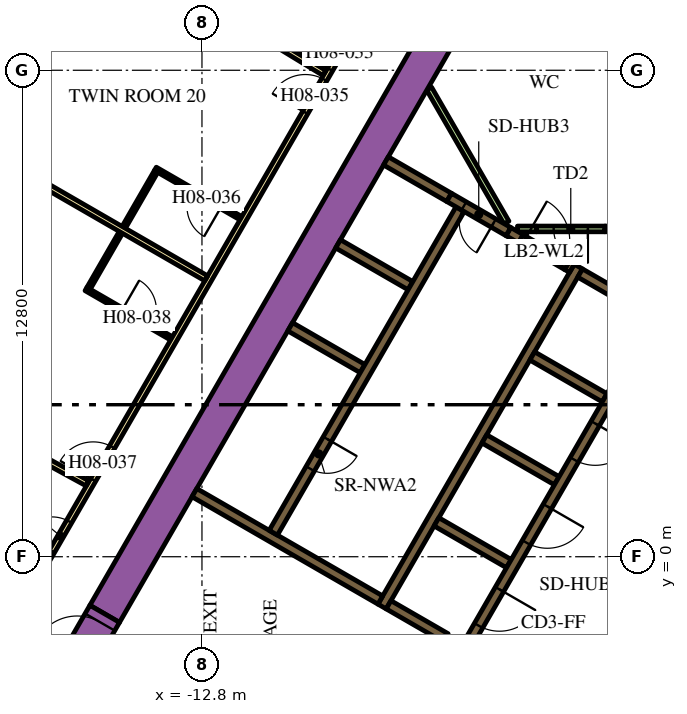
"""IFC4 building model, lengths in metres.
Left out: names, types, materials, properties, quantities, classifications, styles, units other than length and angle.
Written with IfcOpenShell. Run it as: python <this file> out.ifc"""

import sys

from ifc_helpers import new_model, si_unit, direction, frame, frame_2d, origin, place, context, subcontext, project, spatial, polyline, rectangle, outline, extrude, element, fill, save


model = new_model("IFC4")
c1 = context("Model", 3, precision=1e-05, world=origin(), true_north=direction((0.0, 1.0)))
c2 = subcontext(c1, "Body", "Model", "MODEL_VIEW")
j1 = project(units=[si_unit("LENGTHUNIT", "METRE"), si_unit("PLANEANGLEUNIT", "RADIAN")], contexts=[c1])
p1 = place(None, origin())
s1 = spatial("IfcSite", under=j1, at=p1, CompositionType="ELEMENT")
p2 = place(p1, origin())
s2 = spatial("IfcBuilding", under=s1, at=p2, CompositionType="ELEMENT")
p3 = place(p2, frame((0.0, 0.0, 114.9)))
s3 = spatial("IfcBuildingStorey", under=s2, at=p3, CompositionType="ELEMENT", Elevation=114.9)
p4 = place(p3, frame((-15.36, -1.503, 0.0), z_axis=(0.0, 0.0, 1.0), x_axis=(0.50000389221, 0.866023156604, 0.0)))
e1 = element("IfcWall", 1, at=p4, inside=s3, PredefinedType="SOLIDWALL", context=c2, shape_type="SweptSolid", body=[
    extrude(rectangle(XDim=21.0, YDim=0.9, at=frame_2d((10.5, 0.0))), origin(), (0.0, 0.0, 1.0), 3.9),
])
p5 = place(p3, frame((-8.06, -1.311, 0.0), z_axis=(0.0, 0.0, 1.0), x_axis=(0.50000273126, 0.866023826885, 0.0)))
e2 = element("IfcWall", 2, at=p5, inside=s3, PredefinedType="SOLIDWALL", context=c2, shape_type="SweptSolid", body=[
    extrude(rectangle(XDim=10.33, YDim=0.25, at=frame_2d((5.165, 0.0))), origin(), (0.0, 0.0, 1.0), 3.9),
])
p6 = place(p3, frame((-1.647, 6.771, 0.0), z_axis=(0.0, 0.0, 1.0), x_axis=(-0.865971728693, 0.500092956464, 0.0)))
e3 = element("IfcWall", 3, at=p6, inside=s3, PredefinedType="SOLIDWALL", context=c2, shape_type="SweptSolid", body=[
    extrude(rectangle(XDim=1.388, YDim=0.25, at=frame_2d((0.694, 0.0))), origin(), (0.0, 0.0, 1.0), 3.9),
])
for number, where, z_axis, x_axis in (
    (4, (-2.204, 4.182, 0.0), (0.0, 0.0, 1.0), (-0.866, 0.5, 0.0)),
    (5, (-5.369, 3.1, 0.0), (0.0, 0.0, 1.0), (0.866, -0.5, 0.0)),
    (6, (-4.724, -0.182, 0.0), (0.0, 0.0, 1.0), (-0.866, 0.5, 0.0)),
):
    element("IfcWall", number, at=place(p3, frame(where, z_axis=z_axis, x_axis=x_axis)), inside=s3, PredefinedType="SOLIDWALL", context=c2, shape_type="SweptSolid", body=[
        extrude(rectangle(XDim=2.2, YDim=0.25, at=frame_2d((1.1, 0.0))), origin(), (0.0, 0.0, 1.0), 3.9),
    ])
p7 = place(p3, frame((-7.889, -1.265, 0.0), z_axis=(0.0, 0.0, 1.0), x_axis=(0.865986741702, -0.500066958712, 0.0)))
e7 = element("IfcWall", 7, at=p7, inside=s3, PredefinedType="SOLIDWALL", context=c2, shape_type="SweptSolid", body=[
    extrude(rectangle(XDim=1.738, YDim=0.25, at=frame_2d((0.869, 0.0))), origin(), (0.0, 0.0, 1.0), 3.9),
])
p8 = place(p3, frame((-8.106, -1.14, 0.0), z_axis=(0.0, 0.0, 1.0), x_axis=(-0.866000643155, 0.500042884217, 0.0)))
e8 = element("IfcWall", 8, at=p8, inside=s3, PredefinedType="SOLIDWALL", context=c2, shape_type="SweptSolid", body=[
    extrude(rectangle(XDim=5.65, YDim=0.25, at=frame_2d((2.825, 0.0))), origin(), (0.0, 0.0, 1.0), 3.9),
])
p9 = place(p3, origin())
e9 = element("IfcWall", 9, at=p9, inside=s3, PredefinedType="SOLIDWALL", context=c2, shape_type="SweptSolid", body=[
    extrude(outline(polyline([(-3.128, 7.481), (-3.259, 7.557), (-3.134, 7.773), (-3.003, 7.698), (-3.128, 7.481)])), origin(), (0.0, 0.0, 1.0), 3.9),
])
for number, where, z_axis, x_axis in (
    (10, (-8.574, 4.95, 0.0), (0.0, 0.0, 1.0), (-0.866, 0.5, 0.0)),
    (11, (-7.314, 7.132, 0.0), (0.0, 0.0, 1.0), (-0.866, 0.5, 0.0)),
):
    element("IfcWall", number, at=place(p3, frame(where, z_axis=z_axis, x_axis=x_axis)), inside=s3, PredefinedType="SOLIDWALL", context=c2, shape_type="SweptSolid", body=[
        extrude(rectangle(XDim=2.2, YDim=0.25, at=frame_2d((1.1, 0.0))), origin(), (0.0, 0.0, 1.0), 3.9),
    ])
p10 = place(p3, frame((-6.296, 9.455, 0.0), z_axis=(0.0, 0.0, 1.0), x_axis=(-0.866011930837, 0.500023335103, 0.0)))
e12 = element("IfcWall", 12, at=p10, inside=s3, PredefinedType="SOLIDWALL", context=c2, shape_type="SweptSolid", body=[
    extrude(rectangle(XDim=1.92, YDim=0.25, at=frame_2d((0.96, 0.0))), origin(), (0.0, 0.0, 1.0), 3.9),
])
p11 = place(p3, frame((-4.409, 8.365, 0.0), z_axis=(0.0, 0.0, 1.0), x_axis=(-0.866057014183, 0.499945245186, 0.0)))
e13 = element("IfcWall", 13, at=p11, inside=s3, PredefinedType="SOLIDWALL", context=c2, shape_type="SweptSolid", body=[
    extrude(rectangle(XDim=0.379, YDim=0.25, at=frame_2d((0.19, 0.0))), origin(), (0.0, 0.0, 1.0), 3.9),
])
p12 = place(p3, frame((-2.195, 8.625, 0.0), z_axis=(0.0, 0.0, 1.0), x_axis=(1.0, 0.0, 0.0)))
e14 = element("IfcWall", 14, at=p12, inside=s3, PredefinedType="PARTITIONING", context=c2, shape_type="SweptSolid", body=[
    extrude(rectangle(XDim=1.145, YDim=0.15, at=frame_2d((0.573, 0.0))), origin(), (0.0, 0.0, 1.0), 2.75),
])
p13 = place(p3, frame((-6.823, 12.318, 0.0), z_axis=(0.0, 0.0, 1.0), x_axis=(0.500007885066, -0.866020851292, 0.0)))
e15 = element("IfcWall", 15, at=p13, inside=s3, PredefinedType="PARTITIONING", context=c2, shape_type="SweptSolid", body=[
    extrude(rectangle(XDim=4.072, YDim=0.15, at=frame_2d((2.036, 0.0))), origin(), (0.0, 0.0, 1.0), 2.75),
])
p14 = place(p3, frame((-4.498, 8.625, 0.0), z_axis=(0.0, 0.0, 1.0), x_axis=(1.0, 0.0, 0.0)))
e16 = element("IfcWall", 16, at=p14, inside=s3, PredefinedType="PARTITIONING", context=c2, shape_type="SweptSolid", body=[
    extrude(rectangle(XDim=0.502, YDim=0.15, at=frame_2d((0.251, 0.0))), origin(), (0.0, 0.0, 1.0), 2.75),
])
p15 = place(p3, frame((-6.008, 9.144, 0.0), z_axis=(0.0, 0.0, 1.0), x_axis=(-0.500006956611, -0.866021387346, 0.0)))
e17 = element("IfcWall", 17, at=p15, inside=s3, PredefinedType="SOLIDWALL", context=c2, shape_type="SweptSolid", body=[
    extrude(rectangle(XDim=9.83, YDim=0.25, at=frame_2d((4.915, 0.0))), origin(), (0.0, 0.0, 1.0), 3.9),
])
p16 = place(p15, frame((6.985, 0.0, 0.0)))
e18 = element("IfcOpeningElement", 18, at=p16, cuts=e17, PredefinedType="OPENING", context=c2, shape_type="SweptSolid", body=[
    extrude(rectangle(XDim=0.9, YDim=2.1, at=frame_2d((0.45, 1.05))), frame((0.0, 0.135, 0.0), z_axis=(0.0, -1.0, 0.0), x_axis=(1.0, 0.0, 0.0)), (0.0, 0.0, 1.0), 0.27),
])
p17 = place(p3, frame((-0.898, 6.194, 0.0), z_axis=(0.0, 0.0, 1.0), x_axis=(-0.499996202215, -0.866027596426, 0.0)))
e19 = element("IfcWall", 19, at=p17, inside=s3, PredefinedType="SOLIDWALL", context=c2, shape_type="SweptSolid", body=[
    extrude(rectangle(XDim=9.83, YDim=0.25, at=frame_2d((4.915, 0.0))), origin(), (0.0, 0.0, 1.0), 3.9),
])
p18 = place(p17, frame((0.585, 0.0, 0.0)))
e20 = element("IfcOpeningElement", 20, at=p18, cuts=e19, PredefinedType="OPENING", context=c2, shape_type="SweptSolid", body=[
    extrude(rectangle(XDim=1.1, YDim=2.1, at=frame_2d((0.55, 1.05))), frame((0.0, 0.135, 0.0), z_axis=(0.0, -1.0, 0.0), x_axis=(1.0, 0.0, 0.0)), (0.0, 0.0, 1.0), 0.27),
])
p19 = place(p17, frame((3.105, 0.0, 0.0)))
e21 = element("IfcOpeningElement", 21, at=p19, cuts=e19, PredefinedType="OPENING", context=c2, shape_type="SweptSolid", body=[
    extrude(rectangle(XDim=1.1, YDim=2.1, at=frame_2d((0.55, 1.05))), frame((0.0, 0.135, 0.0), z_axis=(0.0, -1.0, 0.0), x_axis=(1.0, 0.0, 0.0)), (0.0, 0.0, 1.0), 0.27),
])
p20 = place(p17, frame((5.625, 0.0, 0.0)))
e22 = element("IfcOpeningElement", 22, at=p20, cuts=e19, PredefinedType="OPENING", context=c2, shape_type="SweptSolid", body=[
    extrude(rectangle(XDim=1.1, YDim=2.1, at=frame_2d((0.55, 1.05))), frame((0.0, 0.135, 0.0), z_axis=(0.0, -1.0, 0.0), x_axis=(1.0, 0.0, 0.0)), (0.0, 0.0, 1.0), 0.27),
])
p21 = place(p17, frame((8.145, 0.0, 0.0)))
e23 = element("IfcOpeningElement", 23, at=p21, cuts=e19, PredefinedType="OPENING", context=c2, shape_type="SweptSolid", body=[
    extrude(rectangle(XDim=1.1, YDim=2.1, at=frame_2d((0.55, 1.05))), frame((0.0, 0.135, 0.0), z_axis=(0.0, -1.0, 0.0), x_axis=(1.0, 0.0, 0.0)), (0.0, 0.0, 1.0), 0.27),
])
p22 = place(p3, frame((-2.195, 8.625, 0.0), z_axis=(0.0, 0.0, 1.0), x_axis=(-1.0, 0.0, 0.0)))
e24 = element("IfcWall", 24, at=p22, inside=s3, PredefinedType="PARTITIONING", context=c2, shape_type="SweptSolid", body=[
    extrude(rectangle(XDim=1.8, YDim=0.15, at=frame_2d((0.9, 0.0))), origin(), (0.0, 0.0, 1.0), 2.75),
])
p23 = place(p22, frame((0.45, 0.0, 0.0)))
e25 = element("IfcOpeningElement", 25, at=p23, cuts=e24, PredefinedType="OPENING", context=c2, shape_type="SweptSolid", body=[
    extrude(rectangle(XDim=0.9, YDim=2.1, at=frame_2d((0.45, 1.05))), frame((0.0, 0.085, 0.0), z_axis=(0.0, -1.0, 0.0), x_axis=(1.0, 0.0, 0.0)), (0.0, 0.0, 1.0), 0.17),
])
p24 = place(p3, frame((-4.409, 8.365, 0.0), z_axis=(0.0, 0.0, 1.0), x_axis=(0.866034573852, -0.49998411664, 0.0)))
e26 = element("IfcWall", 26, at=p24, inside=s3, PredefinedType="SOLIDWALL", context=c2, shape_type="SweptSolid", body=[
    extrude(rectangle(XDim=1.4, YDim=0.25, at=frame_2d((0.7, 0.0))), origin(), (0.0, 0.0, 1.0), 3.9),
])
p25 = place(p24, frame((0.1, 0.0, 0.0)))
e27 = element("IfcOpeningElement", 27, at=p25, cuts=e26, PredefinedType="OPENING", context=c2, shape_type="SweptSolid", body=[
    extrude(rectangle(XDim=1.2, YDim=2.1, at=frame_2d((0.6, 1.05))), frame((0.0, 0.135, 0.0), z_axis=(0.0, -1.0, 0.0), x_axis=(1.0, 0.0, 0.0)), (0.0, 0.0, 1.0), 0.27),
])
p26 = place(p3, frame((-16.209, -2.976, 0.0), z_axis=(0.0, 0.0, 1.0), x_axis=(0.499954529098, 0.86605165483, 0.0)))
e28 = element("IfcWall", 28, at=p26, inside=s3, PredefinedType="SOLIDWALL", context=c2, shape_type="SweptSolid", body=[
    extrude(rectangle(XDim=1.7, YDim=0.9, at=frame_2d((0.85, 0.0))), origin(), (0.0, 0.0, 1.0), 3.9),
])
p27 = place(p26, frame((0.25, 0.0, 0.0)))
e29 = element("IfcOpeningElement", 29, at=p27, cuts=e28, PredefinedType="OPENING", context=c2, shape_type="SweptSolid", body=[
    extrude(rectangle(XDim=1.2, YDim=2.1, at=frame_2d((0.6, 1.05))), frame((0.0, 0.46, 0.0), z_axis=(0.0, -1.0, 0.0), x_axis=(1.0, 0.0, 0.0)), (0.0, 0.0, 1.0), 0.92),
])
p28 = place(p3, frame((-4.737, 8.555, 0.0), z_axis=(0.0, 0.0, 1.0), x_axis=(-0.865989075817, 0.500062916607, 0.0)))
e30 = element("IfcWall", 30, at=p28, inside=s3, PredefinedType="SOLIDWALL", context=c2, shape_type="SweptSolid", body=[
    extrude(rectangle(XDim=1.8, YDim=0.25, at=frame_2d((0.9, 0.0))), origin(), (0.0, 0.0, 1.0), 3.9),
])
p29 = place(p28, frame((0.45, 0.0, 0.0)))
e31 = element("IfcOpeningElement", 31, at=p29, cuts=e30, PredefinedType="OPENING", context=c2, shape_type="SweptSolid", body=[
    extrude(rectangle(XDim=0.9, YDim=2.1, at=frame_2d((0.45, 1.05))), frame((0.0, 0.135, 0.0), z_axis=(0.0, -1.0, 0.0), x_axis=(1.0, 0.0, 0.0)), (0.0, 0.0, 1.0), 0.27),
])
p30 = place(p3, frame((-19.081, -3.9, 0.0), z_axis=(0.0, 0.0, 1.0), x_axis=(0.499998313975, 0.866026377209, 0.0)))
e32 = element("IfcWall", 32, at=p30, inside=s3, PredefinedType="PARTITIONING", context=c2, shape_type="SweptSolid", body=[
    extrude(rectangle(XDim=25.766, YDim=0.15, at=frame_2d((12.883, 0.0))), origin(), (0.0, 0.0, 1.0), 2.75),
])
p31 = place(p30, frame((19.306, 0.0, 0.0)))
e33 = element("IfcOpeningElement", 33, at=p31, cuts=e32, PredefinedType="OPENING", context=c2, shape_type="SweptSolid", body=[
    extrude(rectangle(XDim=1.0, YDim=2.1, at=frame_2d((0.5, 1.05))), frame((0.0, 0.085, 0.0), z_axis=(0.0, -1.0, 0.0), x_axis=(1.0, 0.0, 0.0)), (0.0, 0.0, 1.0), 0.17),
])
p32 = place(p30, frame((18.0, 0.0, 0.0)))
e34 = element("IfcOpeningElement", 34, at=p32, cuts=e32, PredefinedType="OPENING", context=c2, shape_type="SweptSolid", body=[
    extrude(rectangle(XDim=1.0, YDim=2.1, at=frame_2d((0.5, 1.05))), frame((0.0, 0.085, 0.0), z_axis=(0.0, -1.0, 0.0), x_axis=(1.0, 0.0, 0.0)), (0.0, 0.0, 1.0), 0.17),
])
p33 = place(p30, frame((6.838, 0.0, 0.0)))
e35 = element("IfcOpeningElement", 35, at=p33, cuts=e32, PredefinedType="OPENING", context=c2, shape_type="SweptSolid", body=[
    extrude(rectangle(XDim=1.0, YDim=2.1, at=frame_2d((0.5, 1.05))), frame((0.0, 0.085, 0.0), z_axis=(0.0, -1.0, 0.0), x_axis=(1.0, 0.0, 0.0)), (0.0, 0.0, 1.0), 0.17),
])
p34 = place(p30, frame((4.674, 0.0, 0.0)))
e36 = element("IfcOpeningElement", 36, at=p34, cuts=e32, PredefinedType="OPENING", context=c2, shape_type="SweptSolid", body=[
    extrude(rectangle(XDim=0.9, YDim=2.1, at=frame_2d((0.45, 1.05))), frame((0.0, 0.085, 0.0), z_axis=(0.0, -1.0, 0.0), x_axis=(1.0, 0.0, 0.0)), (0.0, 0.0, 1.0), 0.17),
])
p35 = place(p30, frame((0.18, 0.0, 0.0)))
e37 = element("IfcOpeningElement", 37, at=p35, cuts=e32, PredefinedType="OPENING", context=c2, shape_type="SweptSolid", body=[
    extrude(rectangle(XDim=1.0, YDim=2.1, at=frame_2d((0.5, 1.05))), frame((0.0, 0.085, 0.0), z_axis=(0.0, -1.0, 0.0), x_axis=(1.0, 0.0, 0.0)), (0.0, 0.0, 1.0), 0.17),
])
p36 = place(p3, frame((-21.614, 5.102, 0.0), z_axis=(0.0, 0.0, 1.0), x_axis=(0.877484555087, -0.479604895287, 0.0)))
e38 = element("IfcWall", 38, at=p36, inside=s3, PredefinedType="PARTITIONING", context=c2, shape_type="SweptSolid", body=[
    extrude(rectangle(XDim=6.611, YDim=0.15, at=frame_2d((3.306, 0.0))), origin(), (0.0, 0.0, 1.0), 2.75),
])
p37 = place(p3, frame((-18.484, 10.672, 0.0), z_axis=(0.0, 0.0, 1.0), x_axis=(0.866019162053, -0.50001081084, 0.0)))
e39 = element("IfcWall", 39, at=p37, inside=s3, PredefinedType="PARTITIONING", context=c2, shape_type="SweptSolid", body=[
    extrude(rectangle(XDim=6.694, YDim=0.15, at=frame_2d((3.347, 0.0))), origin(), (0.0, 0.0, 1.0), 2.75),
])
p38 = place(p3, frame((-15.225, 16.167, 0.0), z_axis=(0.0, 0.0, 1.0), x_axis=(0.854088713274, -0.520127359266, 0.0)))
e40 = element("IfcWall", 40, at=p38, inside=s3, PredefinedType="PARTITIONING", context=c2, shape_type="SweptSolid", body=[
    extrude(rectangle(XDim=6.611, YDim=0.15, at=frame_2d((3.305, 0.0))), origin(), (0.0, 0.0, 1.0), 2.75),
])
p39 = place(p3, frame((-11.774, 8.906, 0.0), z_axis=(0.0, 0.0, 1.0), x_axis=(-0.865997922154, 0.500047596559, 0.0)))
e41 = element("IfcWall", 41, at=p39, inside=s3, PredefinedType="PARTITIONING", context=c2, shape_type="SweptSolid", body=[
    extrude(rectangle(XDim=2.6, YDim=0.1, at=frame_2d((1.3, 0.0))), origin(), (0.0, 0.0, 1.0), 2.75),
])
p40 = place(p39, frame((0.6, 0.0, 0.0)))
e42 = element("IfcOpeningElement", 42, at=p40, cuts=e41, PredefinedType="OPENING", context=c2, shape_type="SweptSolid", body=[
    extrude(rectangle(XDim=0.9, YDim=2.1, at=frame_2d((0.45, 1.05))), frame((0.0, 0.06, 0.0), z_axis=(0.0, -1.0, 0.0), x_axis=(1.0, 0.0, 0.0)), (0.0, 0.0, 1.0), 0.12),
])
p41 = place(p3, frame((-14.008, 10.138, 0.0), z_axis=(0.0, 0.0, 1.0), x_axis=(-0.499892348375, -0.866087547558, 0.0)))
e43 = element("IfcWall", 43, at=p41, inside=s3, PredefinedType="PARTITIONING", context=c2, shape_type="SweptSolid", body=[
    extrude(rectangle(XDim=1.7, YDim=0.1, at=frame_2d((0.85, 0.0))), origin(), (0.0, 0.0, 1.0), 2.75),
])
p42 = place(p3, frame((-15.852, 7.044, 0.0), z_axis=(0.0, 0.0, 1.0), x_axis=(0.866021400173, -0.500006934395, 0.0)))
e44 = element("IfcWall", 44, at=p42, inside=s3, PredefinedType="PARTITIONING", context=c2, shape_type="SweptSolid", body=[
    extrude(rectangle(XDim=2.6, YDim=0.1, at=frame_2d((1.3, 0.0))), origin(), (0.0, 0.0, 1.0), 2.75),
])
p43 = place(p42, frame((1.1, 0.0, 0.0)))
e45 = element("IfcOpeningElement", 45, at=p43, cuts=e44, PredefinedType="OPENING", context=c2, shape_type="SweptSolid", body=[
    extrude(rectangle(XDim=0.9, YDim=2.1, at=frame_2d((0.45, 1.05))), frame((0.0, 0.06, 0.0), z_axis=(0.0, -1.0, 0.0), x_axis=(1.0, 0.0, 0.0)), (0.0, 0.0, 1.0), 0.12),
])
p44 = place(p3, frame((-15.783, 7.062, 0.0), z_axis=(0.0, 0.0, 1.0), x_axis=(0.499954529098, 0.86605165483, 0.0)))
e46 = element("IfcWall", 46, at=p44, inside=s3, PredefinedType="PARTITIONING", context=c2, shape_type="SweptSolid", body=[
    extrude(rectangle(XDim=1.7, YDim=0.1, at=frame_2d((0.85, 0.0))), origin(), (0.0, 0.0, 1.0), 2.75),
])
p45 = place(p3, frame((-16.203, 15.998, 0.0), z_axis=(0.0, 0.0, 1.0), x_axis=(-0.510054281659, -0.860142214847, 0.0)))
e47 = element("IfcWall", 47, at=p45, inside=s3, PredefinedType="SOLIDWALL", context=c2, shape_type="SweptSolid", body=[
    extrude(rectangle(XDim=5.101, YDim=0.29, at=frame_2d((2.55, 0.0))), origin(), (0.0, 0.0, 1.0), 3.65),
])
p46 = place(p45, frame((0.273, 0.0, 0.9)))
e48 = element("IfcOpeningElement", 48, at=p46, cuts=e47, PredefinedType="OPENING", context=c2, shape_type="SweptSolid", body=[
    extrude(rectangle(XDim=1.35, YDim=2.15, at=frame_2d((0.675, 1.075))), frame((0.0, 0.155, 0.0), z_axis=(0.0, -1.0, 0.0), x_axis=(1.0, 0.0, 0.0)), (0.0, 0.0, 1.0), 0.31),
])
p47 = place(p45, frame((3.478, 0.0, 0.9)))
e49 = element("IfcOpeningElement", 49, at=p47, cuts=e47, PredefinedType="OPENING", context=c2, shape_type="SweptSolid", body=[
    extrude(rectangle(XDim=1.35, YDim=2.15, at=frame_2d((0.675, 1.075))), frame((0.0, 0.155, 0.0), z_axis=(0.0, -1.0, 0.0), x_axis=(1.0, 0.0, 0.0)), (0.0, 0.0, 1.0), 0.31),
])
p48 = place(p16, origin())
e50 = element("IfcDoor", 50, at=p48, inside=s3, OperationType="SINGLE_SWING_LEFT", PredefinedType="DOOR", context=c2, shape_type="SweptSolid", body=[
    extrude(rectangle(XDim=0.9, YDim=2.1, at=frame_2d((0.45, 1.05))), frame((0.0, 0.025, 0.0), z_axis=(0.0, -1.0, 0.0), x_axis=(1.0, 0.0, 0.0)), (0.0, 0.0, 1.0), 0.05),
])
fill(e18, e50)
p49 = place(p19, origin())
e51 = element("IfcDoor", 51, at=p49, inside=s3, OperationType="DOUBLE_DOOR_SLIDING", PredefinedType="DOOR", context=c2, shape_type="SweptSolid", body=[
    extrude(rectangle(XDim=1.1, YDim=2.1, at=frame_2d((0.55, 1.05))), frame((0.0, 0.025, 0.0), z_axis=(0.0, -1.0, 0.0), x_axis=(1.0, 0.0, 0.0)), (0.0, 0.0, 1.0), 0.05),
])
fill(e21, e51)
p50 = place(p20, origin())
e52 = element("IfcDoor", 52, at=p50, inside=s3, OperationType="DOUBLE_DOOR_SLIDING", PredefinedType="DOOR", context=c2, shape_type="SweptSolid", body=[
    extrude(rectangle(XDim=1.1, YDim=2.1, at=frame_2d((0.55, 1.05))), frame((0.0, 0.025, 0.0), z_axis=(0.0, -1.0, 0.0), x_axis=(1.0, 0.0, 0.0)), (0.0, 0.0, 1.0), 0.05),
])
fill(e22, e52)
p51 = place(p21, origin())
e53 = element("IfcDoor", 53, at=p51, inside=s3, OperationType="DOUBLE_DOOR_SLIDING", PredefinedType="DOOR", context=c2, shape_type="SweptSolid", body=[
    extrude(rectangle(XDim=1.1, YDim=2.1, at=frame_2d((0.55, 1.05))), frame((0.0, 0.025, 0.0), z_axis=(0.0, -1.0, 0.0), x_axis=(1.0, 0.0, 0.0)), (0.0, 0.0, 1.0), 0.05),
])
fill(e23, e53)
p52 = place(p23, origin())
e54 = element("IfcDoor", 54, at=p52, inside=s3, OperationType="SINGLE_SWING_LEFT", PredefinedType="DOOR", context=c2, shape_type="SweptSolid", body=[
    extrude(rectangle(XDim=0.9, YDim=2.1, at=frame_2d((0.45, 1.05))), frame((0.0, 0.025, 0.0), z_axis=(0.0, -1.0, 0.0), x_axis=(1.0, 0.0, 0.0)), (0.0, 0.0, 1.0), 0.05),
])
fill(e25, e54)
p53 = place(p25, origin())
e55 = element("IfcDoor", 55, at=p53, inside=s3, OperationType="SINGLE_SWING_LEFT", PredefinedType="DOOR", context=c2, shape_type="SweptSolid", body=[
    extrude(rectangle(XDim=1.2, YDim=2.1, at=frame_2d((0.6, 1.05))), frame((0.0, 0.025, 0.0), z_axis=(0.0, -1.0, 0.0), x_axis=(1.0, 0.0, 0.0)), (0.0, 0.0, 1.0), 0.05),
])
fill(e27, e55)
p54 = place(p27, origin())
e56 = element("IfcDoor", 56, at=p54, inside=s3, OperationType="SINGLE_SWING_LEFT", PredefinedType="DOOR", context=c2, shape_type="SweptSolid", body=[
    extrude(rectangle(XDim=1.2, YDim=2.1, at=frame_2d((0.6, 1.05))), frame((0.0, 0.025, 0.0), z_axis=(0.0, -1.0, 0.0), x_axis=(1.0, 0.0, 0.0)), (0.0, 0.0, 1.0), 0.05),
])
fill(e29, e56)
p55 = place(p29, origin())
e57 = element("IfcDoor", 57, at=p55, inside=s3, OperationType="SINGLE_SWING_LEFT", PredefinedType="DOOR", context=c2, shape_type="SweptSolid", body=[
    extrude(rectangle(XDim=0.9, YDim=2.1, at=frame_2d((0.45, 1.05))), frame((0.0, 0.025, 0.0), z_axis=(0.0, -1.0, 0.0), x_axis=(1.0, 0.0, 0.0)), (0.0, 0.0, 1.0), 0.05),
])
fill(e31, e57)
p56 = place(p31, origin())
e58 = element("IfcDoor", 58, at=p56, inside=s3, OperationType="SINGLE_SWING_LEFT", PredefinedType="DOOR", context=c2, shape_type="SweptSolid", body=[
    extrude(rectangle(XDim=1.0, YDim=2.1, at=frame_2d((0.5, 1.05))), frame((0.0, 0.025, 0.0), z_axis=(0.0, -1.0, 0.0), x_axis=(1.0, 0.0, 0.0)), (0.0, 0.0, 1.0), 0.05),
])
fill(e33, e58)
p57 = place(p32, origin())
e59 = element("IfcDoor", 59, at=p57, inside=s3, OperationType="SINGLE_SWING_RIGHT", PredefinedType="DOOR", context=c2, shape_type="SweptSolid", body=[
    extrude(rectangle(XDim=1.0, YDim=2.1, at=frame_2d((0.5, 1.05))), frame((0.0, 0.025, 0.0), z_axis=(0.0, -1.0, 0.0), x_axis=(1.0, 0.0, 0.0)), (0.0, 0.0, 1.0), 0.05),
])
fill(e34, e59)
p58 = place(p40, origin())
e60 = element("IfcDoor", 60, at=p58, inside=s3, OperationType="SINGLE_SWING_LEFT", PredefinedType="DOOR", context=c2, shape_type="SweptSolid", body=[
    extrude(rectangle(XDim=0.9, YDim=2.1, at=frame_2d((0.45, 1.05))), frame((0.0, 0.025, 0.0), z_axis=(0.0, -1.0, 0.0), x_axis=(1.0, 0.0, 0.0)), (0.0, 0.0, 1.0), 0.05),
])
fill(e42, e60)
p59 = place(p33, origin())
e61 = element("IfcDoor", 61, at=p59, inside=s3, OperationType="SINGLE_SWING_LEFT", PredefinedType="DOOR", context=c2, shape_type="SweptSolid", body=[
    extrude(rectangle(XDim=1.0, YDim=2.1, at=frame_2d((0.5, 1.05))), frame((0.0, 0.025, 0.0), z_axis=(0.0, -1.0, 0.0), x_axis=(1.0, 0.0, 0.0)), (0.0, 0.0, 1.0), 0.05),
])
fill(e35, e61)
p60 = place(p43, origin())
e62 = element("IfcDoor", 62, at=p60, inside=s3, OperationType="SINGLE_SWING_RIGHT", PredefinedType="DOOR", context=c2, shape_type="SweptSolid", body=[
    extrude(rectangle(XDim=0.9, YDim=2.1, at=frame_2d((0.45, 1.05))), frame((0.0, 0.025, 0.0), z_axis=(0.0, -1.0, 0.0), x_axis=(1.0, 0.0, 0.0)), (0.0, 0.0, 1.0), 0.05),
])
fill(e45, e62)
p61 = place(p34, origin())
e63 = element("IfcDoor", 63, at=p61, inside=s3, OperationType="SINGLE_SWING_RIGHT", PredefinedType="DOOR", context=c2, shape_type="SweptSolid", body=[
    extrude(rectangle(XDim=0.9, YDim=2.1, at=frame_2d((0.45, 1.05))), frame((0.0, 0.025, 0.0), z_axis=(0.0, -1.0, 0.0), x_axis=(1.0, 0.0, 0.0)), (0.0, 0.0, 1.0), 0.05),
])
fill(e36, e63)
save(model, sys.argv[1])
